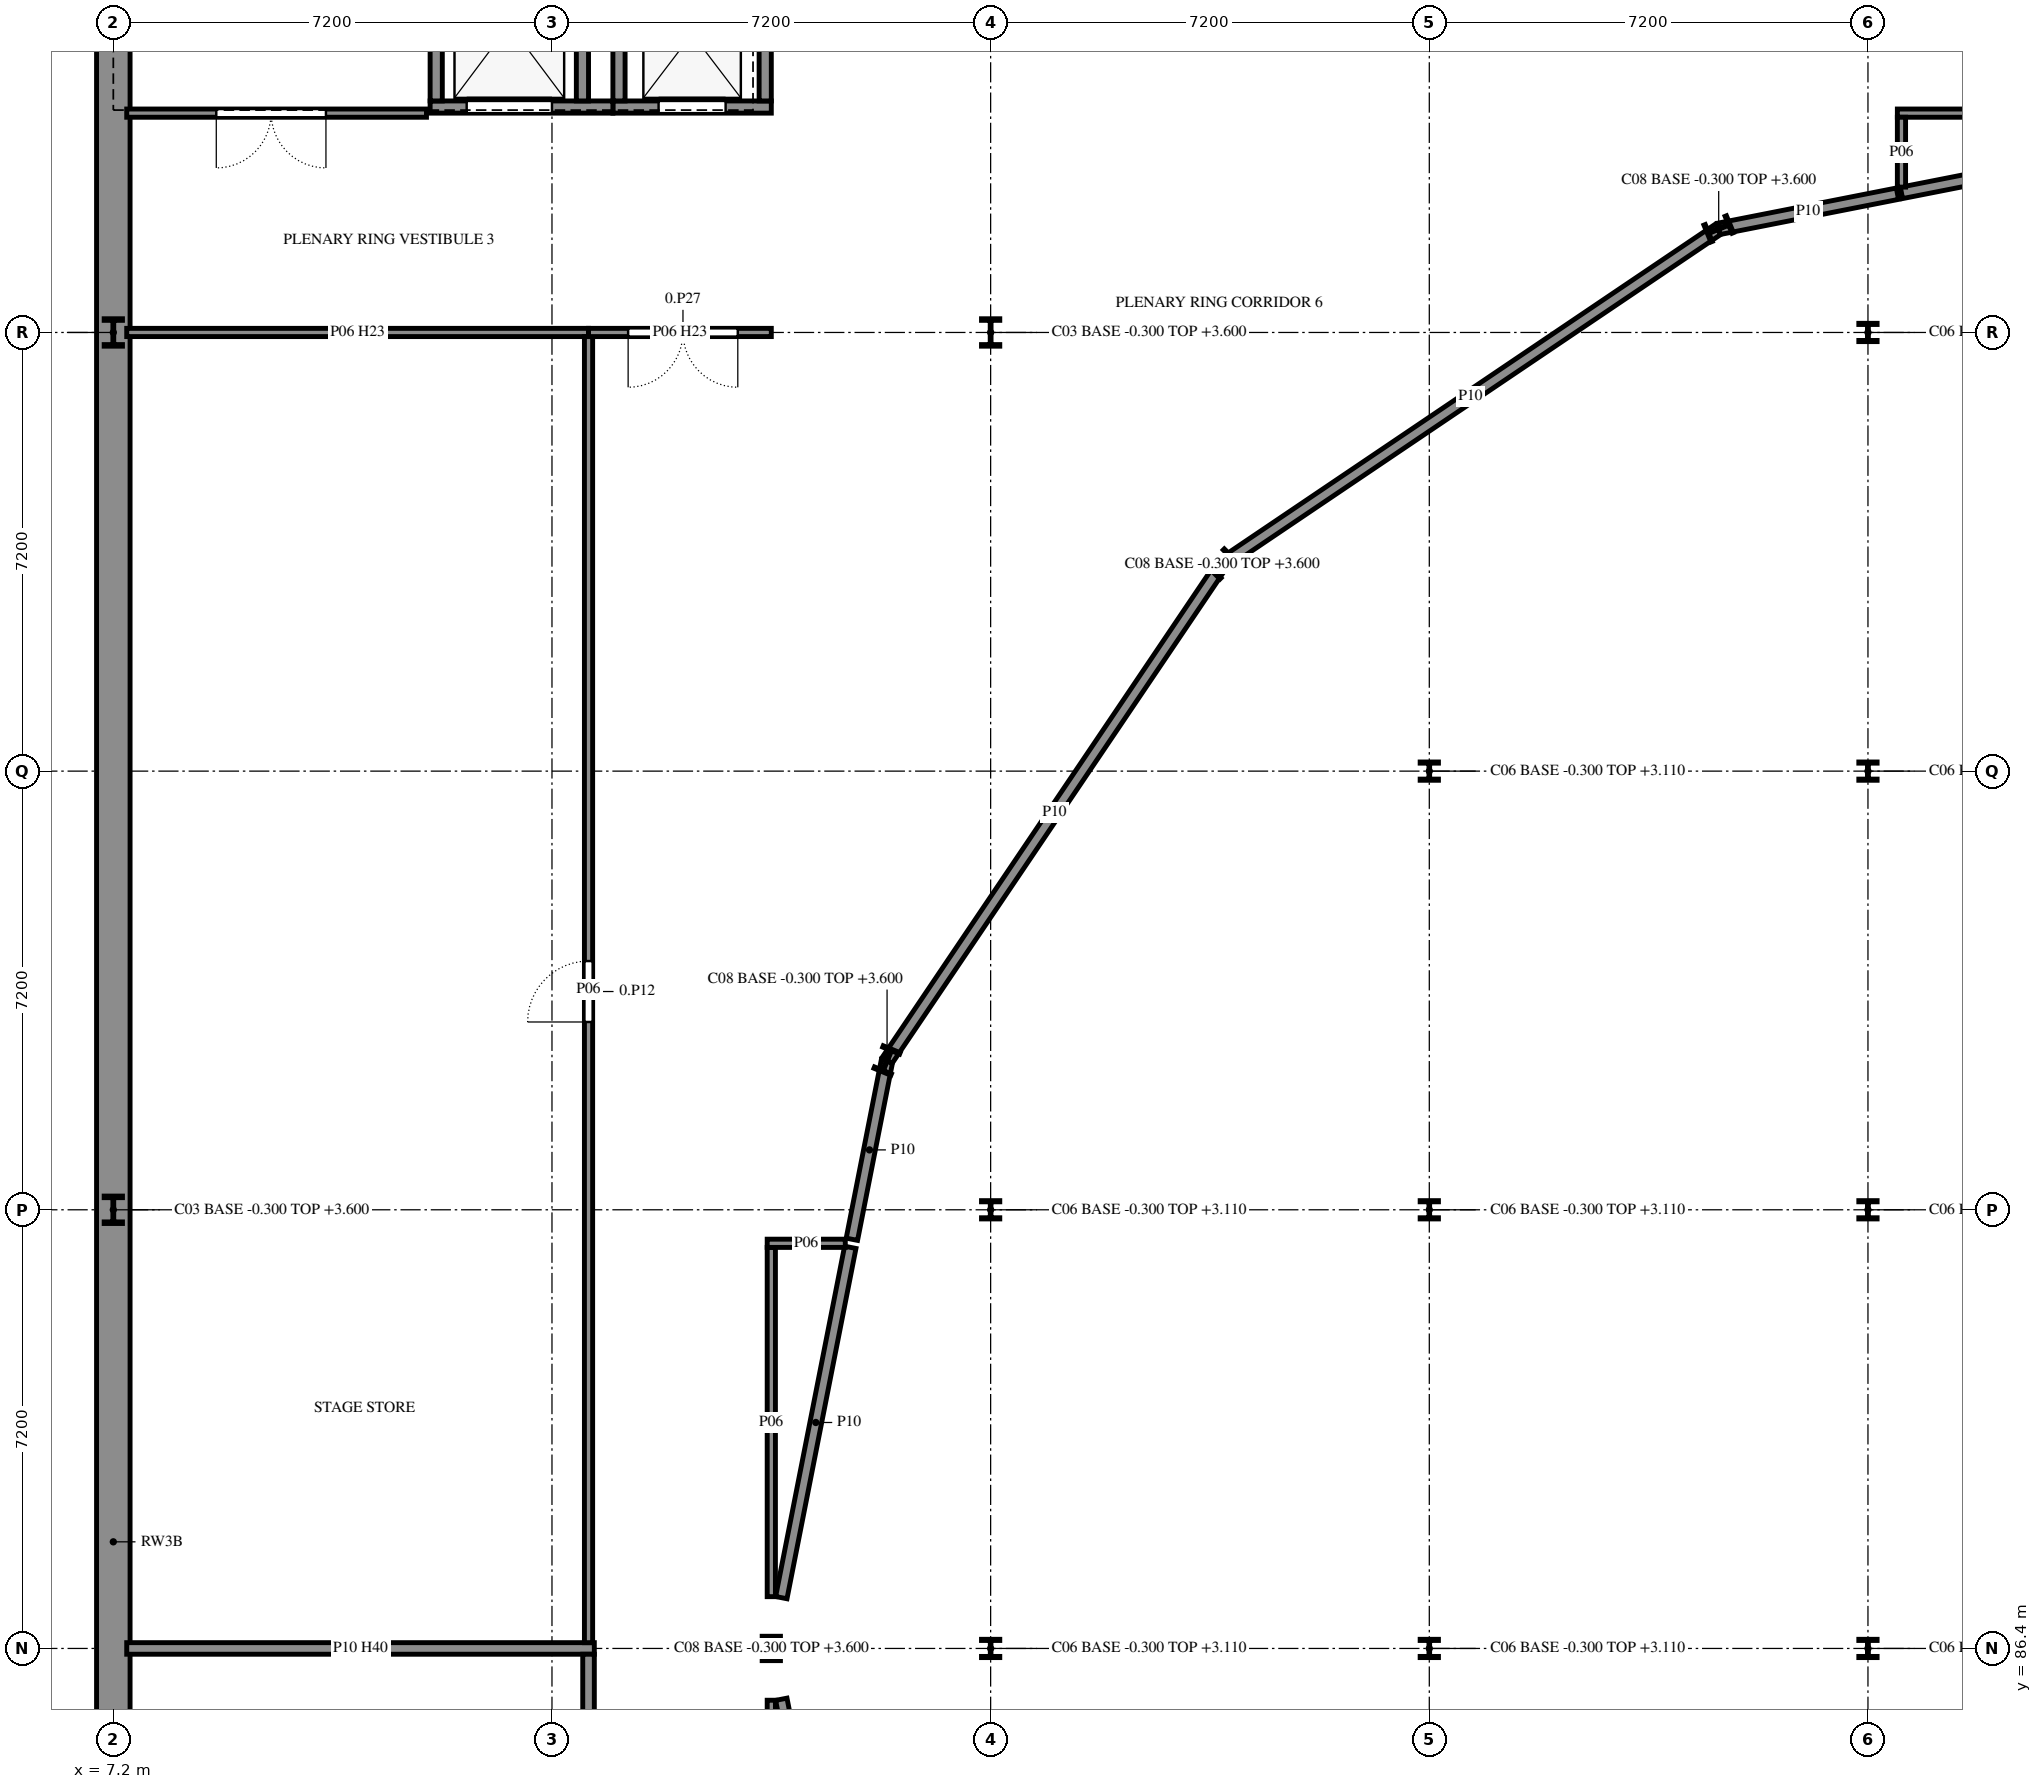
"""IFC4 building model, lengths in metres.
Left out: names, types, materials, properties, quantities, classifications, styles, units other than length and angle.
Written with IfcOpenShell. Run it as: python <this file> out.ifc"""

import sys

from ifc_helpers import new_model, si_unit, direction, frame, frame_2d, origin, origin_2d, place, context, subcontext, project, spatial, rectangle, i_section, extrude, element, fill, save


model = new_model("IFC4")
c1 = context("Model", 3, precision=1e-05, world=origin(), true_north=direction((0.0, 1.0)))
c2 = subcontext(c1, "Body", "Model", "MODEL_VIEW")
j1 = project(units=[si_unit("LENGTHUNIT", "METRE"), si_unit("PLANEANGLEUNIT", "RADIAN")], contexts=[c1])
p1 = place(None, origin())
s1 = spatial("IfcSite", under=j1, at=p1, CompositionType="ELEMENT")
p2 = place(p1, origin())
s2 = spatial("IfcBuilding", under=s1, at=p2, CompositionType="ELEMENT")
p3 = place(p2, origin())
s3 = spatial("IfcBuildingStorey", under=s2, at=p3, CompositionType="ELEMENT", Elevation=0.0)
for number, where, z_axis, x_axis in (
    (1, (7.2, 93.6, -0.3), (0.0, 0.0, 1.0), (1.0, 0.0, 0.0)),
    (2, (7.2, 108.0, -0.3), (0.0, 0.0, 1.0), (1.0, 0.0, 0.0)),
    (3, (21.6, 108.0, -0.3), (0.0, 0.0, 1.0), (1.0, 0.0, 0.0)),
):
    element("IfcColumn", number, at=place(p3, frame(where, z_axis=z_axis, x_axis=x_axis)), inside=s3, PredefinedType="COLUMN", context=c2, shape_type="SweptSolid", body=[
        extrude(i_section(OverallWidth=0.3, OverallDepth=0.45, WebThickness=0.014, FlangeThickness=0.026, FilletRadius=0.027, at=origin_2d()), origin(), (0.0, 0.0, 1.0), 3.9),
    ])
for number, where, z_axis, x_axis in (
    (4, (33.55, 109.7, -0.3), (0.0, 0.0, 1.0), (-0.383, 0.924, 0.0)),
    (5, (25.4, 104.2, -0.3), (0.0, 0.0, 1.0), (-0.707, 0.707, 0.0)),
    (6, (19.9, 96.05, -0.3), (0.0, 0.0, 1.0), (-0.924, 0.383, 0.0)),
    (7, (18.0, 86.4, -0.3), (0.0, 0.0, 1.0), (-1.0, 0.0, 0.0)),
):
    element("IfcColumn", number, at=place(p3, frame(where, z_axis=z_axis, x_axis=x_axis)), inside=s3, PredefinedType="COLUMN", context=c2, shape_type="SweptSolid", body=[
        extrude(i_section(OverallWidth=0.3, OverallDepth=0.4, WebThickness=0.013, FlangeThickness=0.024, FilletRadius=0.027, at=origin_2d()), origin(), (0.0, 0.0, 1.0), 3.9),
    ])
for number, where, z_axis, x_axis in (
    (8, (21.6, 86.4, -0.3), (0.0, 0.0, 1.0), (1.0, 0.0, 0.0)),
    (9, (21.6, 93.6, -0.3), (0.0, 0.0, 1.0), (1.0, 0.0, 0.0)),
    (10, (28.8, 86.4, -0.3), (0.0, 0.0, 1.0), (1.0, 0.0, 0.0)),
    (11, (28.8, 93.6, -0.3), (0.0, 0.0, 1.0), (1.0, 0.0, 0.0)),
    (12, (28.8, 100.8, -0.3), (0.0, 0.0, 1.0), (1.0, 0.0, 0.0)),
    (13, (36.0, 86.4, -0.3), (0.0, 0.0, 1.0), (1.0, 0.0, 0.0)),
    (14, (36.0, 93.6, -0.3), (0.0, 0.0, 1.0), (1.0, 0.0, 0.0)),
    (15, (36.0, 100.8, -0.3), (0.0, 0.0, 1.0), (1.0, 0.0, 0.0)),
    (16, (36.0, 108.0, -0.3), (0.0, 0.0, 1.0), (1.0, 0.0, 0.0)),
):
    element("IfcColumn", number, at=place(p3, frame(where, z_axis=z_axis, x_axis=x_axis)), inside=s3, PredefinedType="COLUMN", context=c2, shape_type="SweptSolid", body=[
        extrude(i_section(OverallWidth=0.3, OverallDepth=0.3, WebThickness=0.011, FlangeThickness=0.019, FilletRadius=0.027, at=origin_2d()), origin(), (0.0, 0.0, 1.0), 3.41),
    ])
p4 = place(p3, frame((7.2, 60.525, 0.0), z_axis=(0.0, 0.0, 1.0), x_axis=(0.0, 1.0, 0.0)))
e17 = element("IfcWall", 17, at=p4, inside=s3, PredefinedType="SOLIDWALL", context=c2, shape_type="SweptSolid", body=[
    extrude(rectangle(XDim=55.25, YDim=0.55, at=frame_2d((27.625, 0.0))), origin(), (0.0, 0.0, 1.0), 3.6),
])
p5 = place(p3, frame((15.4, 111.7, -1.4), z_axis=(0.0, 0.0, 1.0), x_axis=(1.0, 0.0, 0.0)))
e18 = element("IfcWall", 18, at=p5, inside=s3, PredefinedType="SHEAR", context=c2, shape_type="SweptSolid", body=[
    extrude(rectangle(XDim=2.6, YDim=0.2, at=frame_2d((1.3, 0.0))), origin(), (0.0, 0.0, 1.0), 5.0),
])
p6 = place(p5, frame((0.75, 0.0, 1.4)))
e19 = element("IfcOpeningElement", 19, at=p6, cuts=e18, PredefinedType="OPENING", context=c2, shape_type="SweptSolid", body=[
    extrude(rectangle(XDim=1.1, YDim=2.1, at=frame_2d((0.55, 1.05))), frame((0.0, 0.11, 0.0), z_axis=(0.0, -1.0, 0.0), x_axis=(1.0, 0.0, 0.0)), (0.0, 0.0, 1.0), 0.22),
])
for number, where, z_axis, x_axis in (
    (20, (15.5, 111.8, -1.4), (0.0, 0.0, 1.0), (0.0, 1.0, 0.0)),
    (21, (17.9, 111.8, -1.4), (0.0, 0.0, 1.0), (0.0, 1.0, 0.0)),
):
    element("IfcWall", number, at=place(p3, frame(where, z_axis=z_axis, x_axis=x_axis)), inside=s3, PredefinedType="SHEAR", context=c2, shape_type="SweptSolid", body=[
        extrude(rectangle(XDim=2.2, YDim=0.2, at=frame_2d((1.1, 0.0))), origin(), (0.0, 0.0, 1.0), 5.0),
    ])
p7 = place(p3, frame((12.4, 111.7, -1.4), z_axis=(0.0, 0.0, 1.0), x_axis=(1.0, 0.0, 0.0)))
e22 = element("IfcWall", 22, at=p7, inside=s3, PredefinedType="SHEAR", context=c2, shape_type="SweptSolid", body=[
    extrude(rectangle(XDim=3.0, YDim=0.2, at=frame_2d((1.5, 0.0))), origin(), (0.0, 0.0, 1.0), 5.0),
])
p8 = place(p7, frame((0.6, 0.0, 1.4)))
e23 = element("IfcOpeningElement", 23, at=p8, cuts=e22, PredefinedType="OPENING", context=c2, shape_type="SweptSolid", body=[
    extrude(rectangle(XDim=1.4, YDim=2.1, at=frame_2d((0.7, 1.05))), frame((0.0, 0.11, 0.0), z_axis=(0.0, -1.0, 0.0), x_axis=(1.0, 0.0, 0.0)), (0.0, 0.0, 1.0), 0.22),
])
for number, where, z_axis, x_axis in (
    (24, (12.5, 111.8, -1.4), (0.0, 0.0, 1.0), (0.0, 1.0, 0.0)),
    (25, (14.9, 111.8, -1.4), (0.0, 0.0, 1.0), (0.0, 1.0, 0.0)),
):
    element("IfcWall", number, at=place(p3, frame(where, z_axis=z_axis, x_axis=x_axis)), inside=s3, PredefinedType="SHEAR", context=c2, shape_type="SweptSolid", body=[
        extrude(rectangle(XDim=2.5, YDim=0.2, at=frame_2d((1.25, 0.0))), origin(), (0.0, 0.0, 1.0), 5.0),
    ])
p9 = place(p3, frame((12.34, 111.6, 0.0), z_axis=(0.0, 0.0, 1.0), x_axis=(-1.0, 0.0, 0.0)))
e26 = element("IfcWall", 26, at=p9, inside=s3, PredefinedType="PARTITIONING", context=c2, shape_type="SweptSolid", body=[
    extrude(rectangle(XDim=4.92, YDim=0.135, at=frame_2d((2.46, 0.0))), origin(), (0.0, 0.0, 1.0), 3.42),
])
p10 = place(p9, frame((1.65, 0.0, 0.0)))
e27 = element("IfcOpeningElement", 27, at=p10, cuts=e26, PredefinedType="OPENING", context=c2, shape_type="SweptSolid", body=[
    extrude(rectangle(XDim=1.8, YDim=2.4, at=frame_2d((0.9, 1.2))), frame((0.0, 0.077, 0.0), z_axis=(0.0, -1.0, 0.0), x_axis=(1.0, 0.0, 0.0)), (0.0, 0.0, 1.0), 0.155),
])
p11 = place(p3, frame((19.296, 79.816, 0.0), z_axis=(0.0, 0.0, 1.0), x_axis=(-0.193182951231, 0.981162752735, 0.0)))
e28 = element("IfcWall", 28, at=p11, inside=s3, PredefinedType="PARTITIONING", context=c2, shape_type="SweptSolid", body=[
    extrude(rectangle(XDim=5.86, YDim=0.19, at=frame_2d((2.93, 0.0))), origin(), (0.0, 0.0, 1.0), 3.06),
])
p12 = place(p3, frame((19.322, 93.116, 0.0), z_axis=(0.0, 0.0, 1.0), x_axis=(0.193179069745, 0.98116351696, 0.0)))
e29 = element("IfcWall", 29, at=p12, inside=s3, PredefinedType="PARTITIONING", context=c2, shape_type="SweptSolid", body=[
    extrude(rectangle(XDim=2.99, YDim=0.19, at=frame_2d((1.495, 0.0))), origin(), (0.0, 0.0, 1.0), 3.06),
])
p13 = place(p3, frame((19.9, 96.05, 0.0), z_axis=(0.0, 0.0, 1.0), x_axis=(0.559390118145, 0.828904515443, 0.0)))
e30 = element("IfcWall", 30, at=p13, inside=s3, PredefinedType="PARTITIONING", context=c2, shape_type="SweptSolid", body=[
    extrude(rectangle(XDim=9.832, YDim=0.19, at=frame_2d((4.916, 0.0))), origin(), (0.0, 0.0, 1.0), 3.06),
])
p14 = place(p3, frame((25.4, 104.2, 0.0), z_axis=(0.0, 0.0, 1.0), x_axis=(0.828912285216, 0.559378604719, 0.0)))
e31 = element("IfcWall", 31, at=p14, inside=s3, PredefinedType="PARTITIONING", context=c2, shape_type="SweptSolid", body=[
    extrude(rectangle(XDim=9.832, YDim=0.19, at=frame_2d((4.916, 0.0))), origin(), (0.0, 0.0, 1.0), 3.06),
])
p15 = place(p3, frame((33.55, 109.7, 0.0), z_axis=(0.0, 0.0, 1.0), x_axis=(0.98116351696, 0.193179069745, 0.0)))
e32 = element("IfcWall", 32, at=p15, inside=s3, PredefinedType="PARTITIONING", context=c2, shape_type="SweptSolid", body=[
    extrude(rectangle(XDim=2.99, YDim=0.19, at=frame_2d((1.495, 0.0))), origin(), (0.0, 0.0, 1.0), 3.06),
])
p16 = place(p3, frame((36.55, 110.291, 0.0), z_axis=(0.0, 0.0, 1.0), x_axis=(0.981165545066, 0.193168768632, 0.0)))
e33 = element("IfcWall", 33, at=p16, inside=s3, PredefinedType="PARTITIONING", context=c2, shape_type="SweptSolid", body=[
    extrude(rectangle(XDim=5.927, YDim=0.19, at=frame_2d((2.964, 0.0))), origin(), (0.0, 0.0, 1.0), 3.06),
])
p17 = place(p3, frame((18.164, 87.234, 0.0), z_axis=(0.0, 0.0, 1.0), x_axis=(0.193175054921, 0.981164307421, 0.0)))
e34 = element("IfcWall", 34, at=p17, inside=s3, PredefinedType="PARTITIONING", context=c2, shape_type="SweptSolid", body=[
    extrude(rectangle(XDim=5.86, YDim=0.19, at=frame_2d((2.93, 0.0))), origin(), (0.0, 0.0, 1.0), 3.06),
])
p18 = place(p3, frame((7.42, 86.4, 0.0), z_axis=(0.0, 0.0, 1.0), x_axis=(1.0, 0.0, 0.0)))
e35 = element("IfcWall", 35, at=p18, inside=s3, PredefinedType="PARTITIONING", context=c2, shape_type="SweptSolid", body=[
    extrude(rectangle(XDim=7.675, YDim=0.19, at=frame_2d((3.837, 0.0))), origin(), (0.0, 0.0, 1.0), 2.96),
])
p19 = place(p3, frame((15.0, 86.305, 0.0), z_axis=(0.0, 0.0, 1.0), x_axis=(0.0, -1.0, 0.0)))
e36 = element("IfcWall", 36, at=p19, inside=s3, PredefinedType="PARTITIONING", context=c2, shape_type="SweptSolid", body=[
    extrude(rectangle(XDim=21.41, YDim=0.19, at=frame_2d((10.705, 0.0))), origin(), (0.0, 0.0, 1.0), 3.42),
])
p20 = place(p19, frame((9.95, 0.0, 0.0)))
e37 = element("IfcOpeningElement", 37, at=p20, cuts=e36, PredefinedType="OPENING", context=c2, shape_type="SweptSolid", body=[
    extrude(rectangle(XDim=1.5, YDim=2.1, at=frame_2d((0.75, 1.05))), frame((0.0, 0.105, 0.0), z_axis=(0.0, -1.0, 0.0), x_axis=(1.0, 0.0, 0.0)), (0.0, 0.0, 1.0), 0.21),
])
p21 = place(p3, frame((7.42, 108.0, 0.0), z_axis=(0.0, 0.0, 1.0), x_axis=(1.0, 0.0, 0.0)))
e38 = element("IfcWall", 38, at=p21, inside=s3, PredefinedType="PARTITIONING", context=c2, shape_type="SweptSolid", body=[
    extrude(rectangle(XDim=7.58, YDim=0.135, at=frame_2d((3.79, 0.0))), origin(), (0.0, 0.0, 1.0), 2.81),
])
p22 = place(p3, frame((15.0, 107.933, 0.0), z_axis=(0.0, 0.0, 1.0), x_axis=(0.0, -1.0, 0.0)))
e39 = element("IfcWall", 39, at=p22, inside=s3, PredefinedType="PARTITIONING", context=c2, shape_type="SweptSolid", body=[
    extrude(rectangle(XDim=21.438, YDim=0.135, at=frame_2d((10.719, 0.0))), origin(), (0.0, 0.0, 1.0), 3.42),
])
p23 = place(p22, frame((10.25, 0.0, 0.0)))
e40 = element("IfcOpeningElement", 40, at=p23, cuts=e39, PredefinedType="OPENING", context=c2, shape_type="SweptSolid", body=[
    extrude(rectangle(XDim=1.0, YDim=2.4, at=frame_2d((0.5, 1.2))), frame((0.0, 0.077, 0.0), z_axis=(0.0, -1.0, 0.0), x_axis=(1.0, 0.0, 0.0)), (0.0, 0.0, 1.0), 0.155),
])
p24 = place(p3, frame((18.0, 108.0, 0.0), z_axis=(0.0, 0.0, 1.0), x_axis=(-1.0, 0.0, 0.0)))
e41 = element("IfcWall", 41, at=p24, inside=s3, PredefinedType="PARTITIONING", context=c2, shape_type="SweptSolid", body=[
    extrude(rectangle(XDim=3.0, YDim=0.135, at=frame_2d((1.5, 0.0))), origin(), (0.0, 0.0, 1.0), 2.81),
])
p25 = place(p24, frame((0.55, 0.0, 0.0)))
e42 = element("IfcOpeningElement", 42, at=p25, cuts=e41, PredefinedType="OPENING", context=c2, shape_type="SweptSolid", body=[
    extrude(rectangle(XDim=1.8, YDim=2.4, at=frame_2d((0.9, 1.2))), frame((0.0, 0.077, 0.0), z_axis=(0.0, -1.0, 0.0), x_axis=(1.0, 0.0, 0.0)), (0.0, 0.0, 1.0), 0.155),
])
p26 = place(p3, frame((18.0, 85.55, 0.0), z_axis=(0.0, 0.0, 1.0), x_axis=(0.0, -1.0, 0.0)))
e43 = element("IfcWall", 43, at=p26, inside=s3, PredefinedType="PARTITIONING", context=c2, shape_type="SweptSolid", body=[
    extrude(rectangle(XDim=5.733, YDim=0.135, at=frame_2d((2.866, 0.0))), origin(), (0.0, 0.0, 1.0), 3.42),
])
p27 = place(p3, frame((18.0, 92.982, 0.0), z_axis=(0.0, 0.0, 1.0), x_axis=(0.0, -1.0, 0.0)))
e44 = element("IfcWall", 44, at=p27, inside=s3, PredefinedType="PARTITIONING", context=c2, shape_type="SweptSolid", body=[
    extrude(rectangle(XDim=5.732, YDim=0.135, at=frame_2d((2.866, 0.0))), origin(), (0.0, 0.0, 1.0), 3.42),
])
p28 = place(p3, frame((42.35, 111.6, 0.0), z_axis=(0.0, 0.0, 1.0), x_axis=(-1.0, 0.0, 0.0)))
e45 = element("IfcWall", 45, at=p28, inside=s3, PredefinedType="PARTITIONING", context=c2, shape_type="SweptSolid", body=[
    extrude(rectangle(XDim=5.868, YDim=0.135, at=frame_2d((2.934, 0.0))), origin(), (0.0, 0.0, 1.0), 3.42),
])
p29 = place(p3, frame((36.55, 111.532, 0.0), z_axis=(0.0, 0.0, 1.0), x_axis=(0.0, -1.0, 0.0)))
e46 = element("IfcWall", 46, at=p29, inside=s3, PredefinedType="PARTITIONING", context=c2, shape_type="SweptSolid", body=[
    extrude(rectangle(XDim=1.147, YDim=0.135, at=frame_2d((0.573, 0.0))), origin(), (0.0, 0.0, 1.0), 3.42),
])
p30 = place(p3, frame((19.214, 93.05, 0.0), z_axis=(0.0, 0.0, 1.0), x_axis=(-1.0, 0.0, 0.0)))
e47 = element("IfcWall", 47, at=p30, inside=s3, PredefinedType="PARTITIONING", context=c2, shape_type="SweptSolid", body=[
    extrude(rectangle(XDim=1.282, YDim=0.135, at=frame_2d((0.641, 0.0))), origin(), (0.0, 0.0, 1.0), 3.42),
])
p31 = place(p6, origin())
e48 = element("IfcDoor", 48, at=p31, inside=s3, OperationType="SLIDING_TO_LEFT", PredefinedType="DOOR", context=c2, shape_type="SweptSolid", body=[
    extrude(rectangle(XDim=1.1, YDim=2.1, at=frame_2d((0.55, 1.05))), frame((0.0, 0.025, 0.0), z_axis=(0.0, -1.0, 0.0), x_axis=(1.0, 0.0, 0.0)), (0.0, 0.0, 1.0), 0.05),
])
fill(e19, e48)
p32 = place(p8, origin())
e49 = element("IfcDoor", 49, at=p32, inside=s3, OperationType="SLIDING_TO_LEFT", PredefinedType="DOOR", context=c2, shape_type="SweptSolid", body=[
    extrude(rectangle(XDim=1.4, YDim=2.1, at=frame_2d((0.7, 1.05))), frame((0.0, 0.025, 0.0), z_axis=(0.0, -1.0, 0.0), x_axis=(1.0, 0.0, 0.0)), (0.0, 0.0, 1.0), 0.05),
])
fill(e23, e49)
p33 = place(p23, frame((1.0, 0.0, 0.0), z_axis=(0.0, 0.0, 1.0), x_axis=(-1.0, 0.0, 0.0)))
e50 = element("IfcDoor", 50, at=p33, inside=s3, OperationType="SINGLE_SWING_RIGHT", PredefinedType="DOOR", context=c2, shape_type="SweptSolid", body=[
    extrude(rectangle(XDim=1.0, YDim=2.4, at=frame_2d((0.5, 1.2))), frame((0.0, 0.025, 0.0), z_axis=(0.0, -1.0, 0.0), x_axis=(1.0, 0.0, 0.0)), (0.0, 0.0, 1.0), 0.05),
])
fill(e40, e50)
p34 = place(p10, origin())
e51 = element("IfcDoor", 51, at=p34, inside=s3, OperationType="DOUBLE_DOOR_SINGLE_SWING", PredefinedType="DOOR", context=c2, shape_type="SweptSolid", body=[
    extrude(rectangle(XDim=1.8, YDim=2.4, at=frame_2d((0.9, 1.2))), frame((0.0, 0.025, 0.0), z_axis=(0.0, -1.0, 0.0), x_axis=(1.0, 0.0, 0.0)), (0.0, 0.0, 1.0), 0.05),
])
fill(e27, e51)
p35 = place(p25, origin())
e52 = element("IfcDoor", 52, at=p35, inside=s3, OperationType="DOUBLE_DOOR_SINGLE_SWING", PredefinedType="DOOR", context=c2, shape_type="SweptSolid", body=[
    extrude(rectangle(XDim=1.8, YDim=2.4, at=frame_2d((0.9, 1.2))), frame((0.0, 0.025, 0.0), z_axis=(0.0, -1.0, 0.0), x_axis=(1.0, 0.0, 0.0)), (0.0, 0.0, 1.0), 0.05),
])
fill(e42, e52)
save(model, sys.argv[1])
